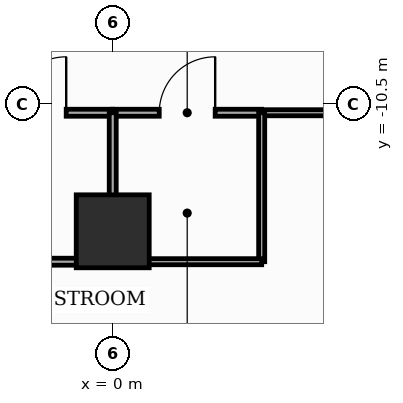
"""IFC4 building model, lengths in metres.
Left out: names, types, materials, properties, quantities, classifications, styles, units other than length and angle.
Written with IfcOpenShell. Run it as: python <this file> out.ifc"""

import sys

from ifc_helpers import new_model, si_unit, direction, frame, frame_2d, origin, origin_2d, place, context, subcontext, project, spatial, rectangle, extrude, element, fill, save


model = new_model("IFC4")
c1 = context("Model", 3, precision=1e-05, world=origin(), true_north=direction((0.0, 1.0)))
c2 = subcontext(c1, "Body", "Model", "MODEL_VIEW")
j1 = project(units=[si_unit("LENGTHUNIT", "METRE"), si_unit("PLANEANGLEUNIT", "RADIAN")], contexts=[c1])
p1 = place(None, origin())
s1 = spatial("IfcSite", under=j1, at=p1, CompositionType="ELEMENT")
p2 = place(p1, origin())
s2 = spatial("IfcBuilding", under=s1, at=p2, CompositionType="ELEMENT")
p3 = place(p2, frame((0.0, 0.0, 180.5)))
s3 = spatial("IfcBuildingStorey", under=s2, at=p3, CompositionType="ELEMENT", Elevation=180.5)
p4 = place(p3, frame((0.0, -12.6, 0.0), z_axis=(0.0, 0.0, 1.0), x_axis=(1.0, 0.0, 0.0)))
e1 = element("IfcColumn", 1, at=p4, inside=s3, PredefinedType="COLUMN", context=c2, shape_type="SweptSolid", body=[
    extrude(rectangle(XDim=1.2, YDim=1.2, at=origin_2d()), origin(), (0.0, 0.0, 1.0), 3.7),
])
p5 = place(p3, frame((-2.45, -10.65, 0.0), z_axis=(0.0, 0.0, 1.0), x_axis=(1.0, 0.0, 0.0)))
e2 = element("IfcWall", 2, at=p5, inside=s3, PredefinedType="PARTITIONING", context=c2, shape_type="SweptSolid", body=[
    extrude(rectangle(XDim=2.45, YDim=0.115, at=frame_2d((1.225, 0.0))), origin(), (0.0, 0.0, 1.0), 2.885),
])
p6 = place(p5, frame((0.765, 0.0, 0.0)))
e3 = element("IfcOpeningElement", 3, at=p6, cuts=e2, PredefinedType="OPENING", context=c2, shape_type="SweptSolid", body=[
    extrude(rectangle(XDim=0.92, YDim=2.1, at=frame_2d((0.46, 1.05))), frame((0.0, 0.067, 0.0), z_axis=(0.0, -1.0, 0.0), x_axis=(1.0, 0.0, 0.0)), (0.0, 0.0, 1.0), 0.135),
])
p7 = place(p3, frame((2.45, -10.65, 0.0), z_axis=(0.0, 0.0, 1.0), x_axis=(1.0, 0.0, 0.0)))
e4 = element("IfcWall", 4, at=p7, inside=s3, PredefinedType="MOVABLE", context=c2, shape_type="SweptSolid", body=[
    extrude(rectangle(XDim=7.7, YDim=0.1, at=frame_2d((3.85, 0.0))), origin(), (0.0, 0.0, 1.0), 2.085),
])
p8 = place(p3, frame((0.0, -10.65, 0.0), z_axis=(0.0, 0.0, 1.0), x_axis=(1.0, 0.0, 0.0)))
e5 = element("IfcWall", 5, at=p8, inside=s3, PredefinedType="PARTITIONING", context=c2, shape_type="SweptSolid", body=[
    extrude(rectangle(XDim=2.45, YDim=0.115, at=frame_2d((1.225, 0.0))), origin(), (0.0, 0.0, 1.0), 3.5),
])
p9 = place(p8, frame((0.765, 0.0, 0.0)))
e6 = element("IfcOpeningElement", 6, at=p9, cuts=e5, PredefinedType="OPENING", context=c2, shape_type="SweptSolid", body=[
    extrude(rectangle(XDim=0.92, YDim=2.1, at=frame_2d((0.46, 1.05))), frame((0.0, 0.067, 0.0), z_axis=(0.0, -1.0, 0.0), x_axis=(1.0, 0.0, 0.0)), (0.0, 0.0, 1.0), 0.135),
])
p10 = place(p3, frame((-2.45, -13.1, 0.0), z_axis=(0.0, 0.0, 1.0), x_axis=(1.0, 0.0, 0.0)))
e7 = element("IfcWall", 7, at=p10, inside=s3, PredefinedType="PARTITIONING", context=c2, shape_type="SweptSolid", body=[
    extrude(rectangle(XDim=2.45, YDim=0.115, at=frame_2d((1.225, 0.0))), origin(), (0.0, 0.0, 1.0), 2.085),
])
p11 = place(p3, frame((0.0, -13.1, 0.0), z_axis=(0.0, 0.0, 1.0), x_axis=(0.0, 1.0, 0.0)))
e8 = element("IfcWall", 8, at=p11, inside=s3, PredefinedType="PARTITIONING", context=c2, shape_type="SweptSolid", body=[
    extrude(rectangle(XDim=2.45, YDim=0.115, at=frame_2d((1.225, 0.0))), origin(), (0.0, 0.0, 1.0), 2.085),
])
p12 = place(p3, frame((2.45, -10.65, 0.0), z_axis=(0.0, 0.0, 1.0), x_axis=(0.0, -1.0, 0.0)))
e9 = element("IfcWall", 9, at=p12, inside=s3, PredefinedType="MOVABLE", context=c2, shape_type="SweptSolid", body=[
    extrude(rectangle(XDim=2.45, YDim=0.1, at=frame_2d((1.225, 0.0))), origin(), (0.0, 0.0, 1.0), 2.885),
])
p13 = place(p3, frame((2.45, -13.1, 0.0), z_axis=(0.0, 0.0, 1.0), x_axis=(-1.0, 0.0, 0.0)))
e10 = element("IfcWall", 10, at=p13, inside=s3, PredefinedType="MOVABLE", context=c2, shape_type="SweptSolid", body=[
    extrude(rectangle(XDim=2.45, YDim=0.1, at=frame_2d((1.225, 0.0))), origin(), (0.0, 0.0, 1.0), 2.085),
])
p14 = place(p6, origin())
e11 = element("IfcDoor", 11, at=p14, inside=s3, OperationType="SINGLE_SWING_RIGHT", PredefinedType="DOOR", context=c2, shape_type="SweptSolid", body=[
    extrude(rectangle(XDim=0.92, YDim=2.1, at=frame_2d((0.46, 1.05))), frame((0.0, 0.025, 0.0), z_axis=(0.0, -1.0, 0.0), x_axis=(1.0, 0.0, 0.0)), (0.0, 0.0, 1.0), 0.05),
])
fill(e3, e11)
p15 = place(p9, origin())
e12 = element("IfcDoor", 12, at=p15, inside=s3, OperationType="SINGLE_SWING_RIGHT", PredefinedType="DOOR", context=c2, shape_type="SweptSolid", body=[
    extrude(rectangle(XDim=0.92, YDim=2.1, at=frame_2d((0.46, 1.05))), frame((0.0, 0.025, 0.0), z_axis=(0.0, -1.0, 0.0), x_axis=(1.0, 0.0, 0.0)), (0.0, 0.0, 1.0), 0.05),
])
fill(e6, e12)
save(model, sys.argv[1])
